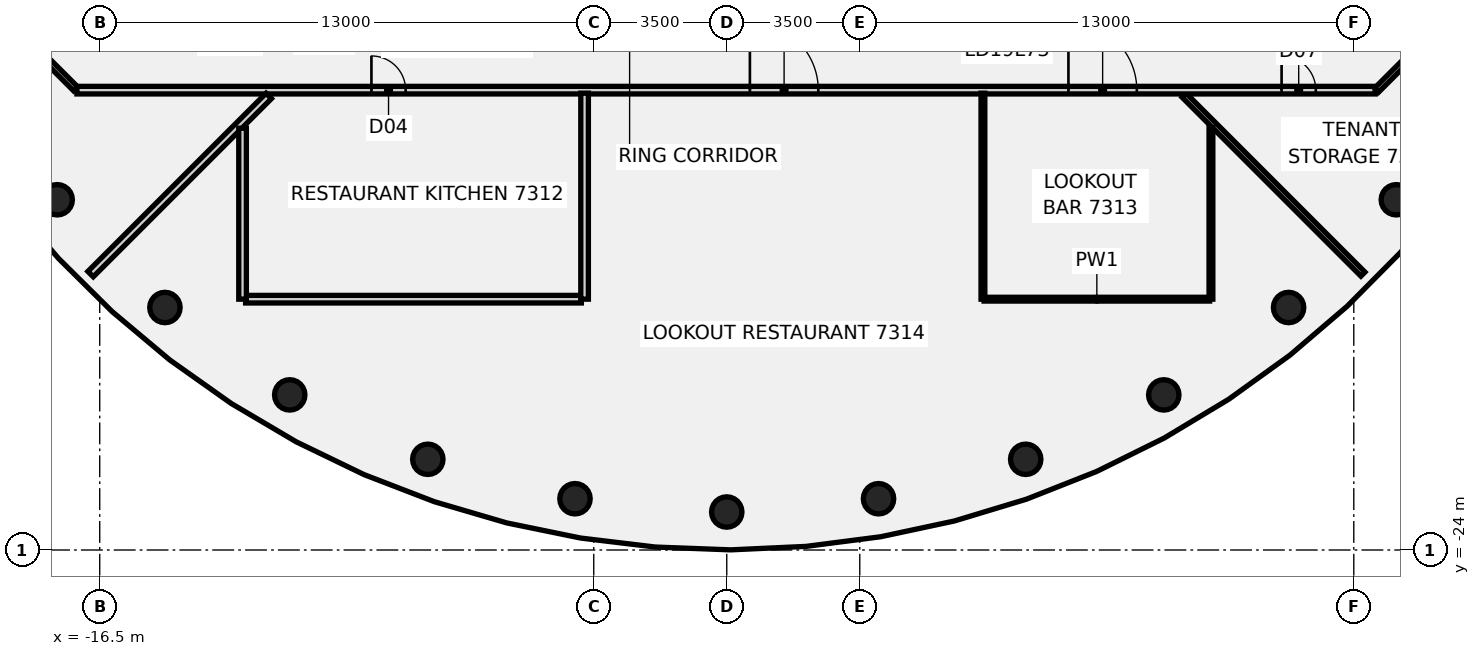
"""IFC4 building model, lengths in metres.
Left out: names, types, materials, properties, quantities, classifications, styles, units other than length and angle.
Written with IfcOpenShell. Run it as: python <this file> out.ifc"""

import sys

from ifc_helpers import new_model, si_unit, direction, frame, frame_2d, origin, origin_2d, place, context, subcontext, project, spatial, rectangle, circle, extrude, element, fill, save


model = new_model("IFC4")
c1 = context("Model", 3, precision=1e-05, world=origin(), true_north=direction((0.0, 1.0)))
c2 = subcontext(c1, "Body", "Model", "MODEL_VIEW")
j1 = project(units=[si_unit("LENGTHUNIT", "METRE"), si_unit("PLANEANGLEUNIT", "RADIAN")], contexts=[c1])
p1 = place(None, origin())
s1 = spatial("IfcSite", under=j1, at=p1, CompositionType="ELEMENT")
p2 = place(p1, origin())
s2 = spatial("IfcBuilding", under=s1, at=p2, CompositionType="ELEMENT")
p3 = place(p2, frame((0.0, 0.0, 294.4)))
s3 = spatial("IfcBuildingStorey", under=s2, at=p3, CompositionType="ELEMENT", Elevation=294.4)
for number, where, z_axis, x_axis in (
    (1, (-17.619, -14.784, -0.2), (0.0, 0.0, 1.0), (1.0, 0.0, 0.0)),
    (2, (-14.784, -17.619, -0.2), (0.0, 0.0, 1.0), (1.0, 0.0, 0.0)),
    (3, (-11.5, -19.919, -0.2), (0.0, 0.0, 1.0), (1.0, 0.0, 0.0)),
    (4, (-7.866, -21.613, -0.2), (0.0, 0.0, 1.0), (1.0, 0.0, 0.0)),
    (5, (-3.994, -22.651, -0.2), (0.0, 0.0, 1.0), (1.0, 0.0, 0.0)),
    (6, (0.0, -23.0, -0.2), (0.0, 0.0, 1.0), (1.0, 0.0, 0.0)),
    (7, (3.994, -22.651, -0.2), (0.0, 0.0, 1.0), (1.0, 0.0, 0.0)),
    (8, (7.866, -21.613, -0.2), (0.0, 0.0, 1.0), (1.0, 0.0, 0.0)),
    (9, (11.5, -19.919, -0.2), (0.0, 0.0, 1.0), (1.0, 0.0, 0.0)),
    (10, (14.784, -17.619, -0.2), (0.0, 0.0, 1.0), (1.0, 0.0, 0.0)),
    (11, (17.619, -14.784, -0.2), (0.0, 0.0, 1.0), (1.0, 0.0, 0.0)),
):
    element("IfcColumn", number, at=place(p3, frame(where, z_axis=z_axis, x_axis=x_axis)), inside=s3, PredefinedType="COLUMN", context=c2, shape_type="SweptSolid", body=[
        extrude(circle(Radius=0.4, at=origin_2d()), origin(), (0.0, 0.0, 1.0), 4.95),
    ])
p4 = place(p3, frame((-18.872, -10.128, 0.0), z_axis=(0.0, 0.0, 1.0), x_axis=(0.707106781187, -0.707106781187, 0.0)))
e12 = element("IfcWall", 12, at=p4, inside=s3, PredefinedType="PARTITIONING", context=c2, shape_type="SweptSolid", body=[
    extrude(rectangle(XDim=2.455, YDim=0.15, at=frame_2d((1.228, 0.0))), origin(), (0.0, 0.0, 1.0), 4.05),
])
p5 = place(p3, frame((12.034, -12.034, 0.0), z_axis=(0.0, 0.0, 1.0), x_axis=(0.707106781187, -0.707106781187, 0.0)))
e13 = element("IfcWall", 13, at=p5, inside=s3, PredefinedType="PARTITIONING", context=c2, shape_type="SweptSolid", body=[
    extrude(rectangle(XDim=6.655, YDim=0.15, at=frame_2d((3.328, 0.0))), origin(), (0.0, 0.0, 1.0), 4.05),
])
p6 = place(p3, frame((-17.1, -11.9, 0.0), z_axis=(0.0, 0.0, 1.0), x_axis=(1.0, 0.0, 0.0)))
e14 = element("IfcWall", 14, at=p6, inside=s3, PredefinedType="PARTITIONING", context=c2, shape_type="SweptSolid", body=[
    extrude(rectangle(XDim=34.165, YDim=0.2, at=frame_2d((17.083, 0.0))), origin(), (0.0, 0.0, 1.0), 4.05),
])
p7 = place(p6, frame((7.75, 0.0, 0.0)))
e15 = element("IfcOpeningElement", 15, at=p7, cuts=e14, PredefinedType="OPENING", context=c2, shape_type="SweptSolid", body=[
    extrude(rectangle(XDim=0.9, YDim=2.1, at=frame_2d((0.45, 1.05))), frame((0.0, 0.11, 0.0), z_axis=(0.0, -1.0, 0.0), x_axis=(1.0, 0.0, 0.0)), (0.0, 0.0, 1.0), 0.22),
])
p8 = place(p6, frame((26.091, 0.0, 0.0)))
e16 = element("IfcOpeningElement", 16, at=p8, cuts=e14, PredefinedType="OPENING", context=c2, shape_type="SweptSolid", body=[
    extrude(rectangle(XDim=1.8, YDim=2.1, at=frame_2d((0.9, 1.05))), frame((0.0, 0.11, 0.0), z_axis=(0.0, -1.0, 0.0), x_axis=(1.0, 0.0, 0.0)), (0.0, 0.0, 1.0), 0.22),
])
p9 = place(p6, frame((17.709, 0.0, 0.0)))
e17 = element("IfcOpeningElement", 17, at=p9, cuts=e14, PredefinedType="OPENING", context=c2, shape_type="SweptSolid", body=[
    extrude(rectangle(XDim=1.8, YDim=2.1, at=frame_2d((0.9, 1.05))), frame((0.0, 0.11, 0.0), z_axis=(0.0, -1.0, 0.0), x_axis=(1.0, 0.0, 0.0)), (0.0, 0.0, 1.0), 0.22),
])
p10 = place(p6, frame((31.7, 0.0, 0.0)))
e18 = element("IfcOpeningElement", 18, at=p10, cuts=e14, PredefinedType="OPENING", context=c2, shape_type="SweptSolid", body=[
    extrude(rectangle(XDim=0.9, YDim=2.1, at=frame_2d((0.45, 1.05))), frame((0.0, 0.11, 0.0), z_axis=(0.0, -1.0, 0.0), x_axis=(1.0, 0.0, 0.0)), (0.0, 0.0, 1.0), 0.22),
])
p11 = place(p3, frame((-12.661, -17.4, 0.0), z_axis=(0.0, 0.0, 1.0), x_axis=(1.0, 0.0, 0.0)))
e19 = element("IfcWall", 19, at=p11, inside=s3, PredefinedType="PARTITIONING", context=c2, shape_type="SweptSolid", body=[
    extrude(rectangle(XDim=8.835, YDim=0.2, at=frame_2d((4.417, 0.0))), origin(), (0.0, 0.0, 1.0), 4.05),
])
p12 = place(p3, frame((6.771, -17.4, 0.0), z_axis=(0.0, 0.0, 1.0), x_axis=(1.0, 0.0, 0.0)))
e20 = element("IfcWall", 20, at=p12, inside=s3, PredefinedType="PARTITIONING", context=c2, shape_type="SweptSolid", body=[
    extrude(rectangle(XDim=5.935, YDim=0.1, at=frame_2d((2.968, 0.0))), origin(), (0.0, 0.0, 1.0), 4.05),
])
p13 = place(p3, frame((-16.74, -16.74, 0.0), z_axis=(0.0, 0.0, 1.0), x_axis=(0.707106781187, 0.707106781187, 0.0)))
e21 = element("IfcWall", 21, at=p13, inside=s3, PredefinedType="PARTITIONING", context=c2, shape_type="SweptSolid", body=[
    extrude(rectangle(XDim=6.631, YDim=0.2, at=frame_2d((3.315, 0.0))), origin(), (0.0, 0.0, 1.0), 4.05),
])
p14 = place(p3, frame((17.1, -11.9, 0.0), z_axis=(0.0, 0.0, 1.0), x_axis=(0.707106781187, 0.707106781187, 0.0)))
e22 = element("IfcWall", 22, at=p14, inside=s3, PredefinedType="PARTITIONING", context=c2, shape_type="SweptSolid", body=[
    extrude(rectangle(XDim=2.505, YDim=0.15, at=frame_2d((1.253, 0.0))), origin(), (0.0, 0.0, 1.0), 4.05),
])
p15 = place(p3, frame((-12.741, -17.4, 0.0), z_axis=(0.0, 0.0, 1.0), x_axis=(0.0, 1.0, 0.0)))
e23 = element("IfcWall", 23, at=p15, inside=s3, PredefinedType="PARTITIONING", context=c2, shape_type="SweptSolid", body=[
    extrude(rectangle(XDim=4.499, YDim=0.2, at=frame_2d((2.25, 0.0))), origin(), (0.0, 0.0, 1.0), 4.05),
])
p16 = place(p3, frame((-3.741, -17.4, 0.0), z_axis=(0.0, 0.0, 1.0), x_axis=(0.0, 1.0, 0.0)))
e24 = element("IfcWall", 24, at=p16, inside=s3, PredefinedType="PARTITIONING", context=c2, shape_type="SweptSolid", body=[
    extrude(rectangle(XDim=5.42, YDim=0.2, at=frame_2d((2.71, 0.0))), origin(), (0.0, 0.0, 1.0), 4.05),
])
p17 = place(p3, frame((6.741, -17.4, 0.0), z_axis=(0.0, 0.0, 1.0), x_axis=(0.0, 1.0, 0.0)))
e25 = element("IfcWall", 25, at=p17, inside=s3, PredefinedType="PARTITIONING", context=c2, shape_type="SweptSolid", body=[
    extrude(rectangle(XDim=5.42, YDim=0.1, at=frame_2d((2.71, 0.0))), origin(), (0.0, 0.0, 1.0), 4.05),
])
p18 = place(p3, frame((12.741, -17.4, 0.0), z_axis=(0.0, 0.0, 1.0), x_axis=(0.0, 1.0, 0.0)))
e26 = element("IfcWall", 26, at=p18, inside=s3, PredefinedType="PARTITIONING", context=c2, shape_type="SweptSolid", body=[
    extrude(rectangle(XDim=4.519, YDim=0.1, at=frame_2d((2.259, 0.0))), origin(), (0.0, 0.0, 1.0), 4.05),
])
p19 = place(p7, frame((0.9, 0.0, 0.0), z_axis=(0.0, 0.0, 1.0), x_axis=(-1.0, 0.0, 0.0)))
e27 = element("IfcDoor", 27, at=p19, inside=s3, OperationType="SINGLE_SWING_LEFT", PredefinedType="DOOR", context=c2, shape_type="SweptSolid", body=[
    extrude(rectangle(XDim=0.9, YDim=2.1, at=frame_2d((0.45, 1.05))), frame((0.0, 0.025, 0.0), z_axis=(0.0, -1.0, 0.0), x_axis=(1.0, 0.0, 0.0)), (0.0, 0.0, 1.0), 0.05),
])
fill(e15, e27)
p20 = place(p8, frame((1.8, 0.0, 0.0), z_axis=(0.0, 0.0, 1.0), x_axis=(-1.0, 0.0, 0.0)))
e28 = element("IfcDoor", 28, at=p20, inside=s3, OperationType="DOUBLE_DOOR_SINGLE_SWING", PredefinedType="DOOR", context=c2, shape_type="SweptSolid", body=[
    extrude(rectangle(XDim=1.8, YDim=2.1, at=frame_2d((0.9, 1.05))), frame((0.0, 0.025, 0.0), z_axis=(0.0, -1.0, 0.0), x_axis=(1.0, 0.0, 0.0)), (0.0, 0.0, 1.0), 0.05),
])
fill(e16, e28)
p21 = place(p9, origin())
e29 = element("IfcDoor", 29, at=p21, inside=s3, OperationType="DOUBLE_DOOR_SINGLE_SWING", PredefinedType="DOOR", context=c2, shape_type="SweptSolid", body=[
    extrude(rectangle(XDim=1.8, YDim=2.1, at=frame_2d((0.9, 1.05))), frame((0.0, 0.025, 0.0), z_axis=(0.0, -1.0, 0.0), x_axis=(1.0, 0.0, 0.0)), (0.0, 0.0, 1.0), 0.05),
])
fill(e17, e29)
p22 = place(p10, frame((0.9, 0.0, 0.0), z_axis=(0.0, 0.0, 1.0), x_axis=(-1.0, 0.0, 0.0)))
e30 = element("IfcDoor", 30, at=p22, inside=s3, OperationType="SINGLE_SWING_RIGHT", PredefinedType="DOOR", context=c2, shape_type="SweptSolid", body=[
    extrude(rectangle(XDim=0.9, YDim=2.1, at=frame_2d((0.45, 1.05))), frame((0.0, 0.025, 0.0), z_axis=(0.0, -1.0, 0.0), x_axis=(1.0, 0.0, 0.0)), (0.0, 0.0, 1.0), 0.05),
])
fill(e18, e30)
save(model, sys.argv[1])
